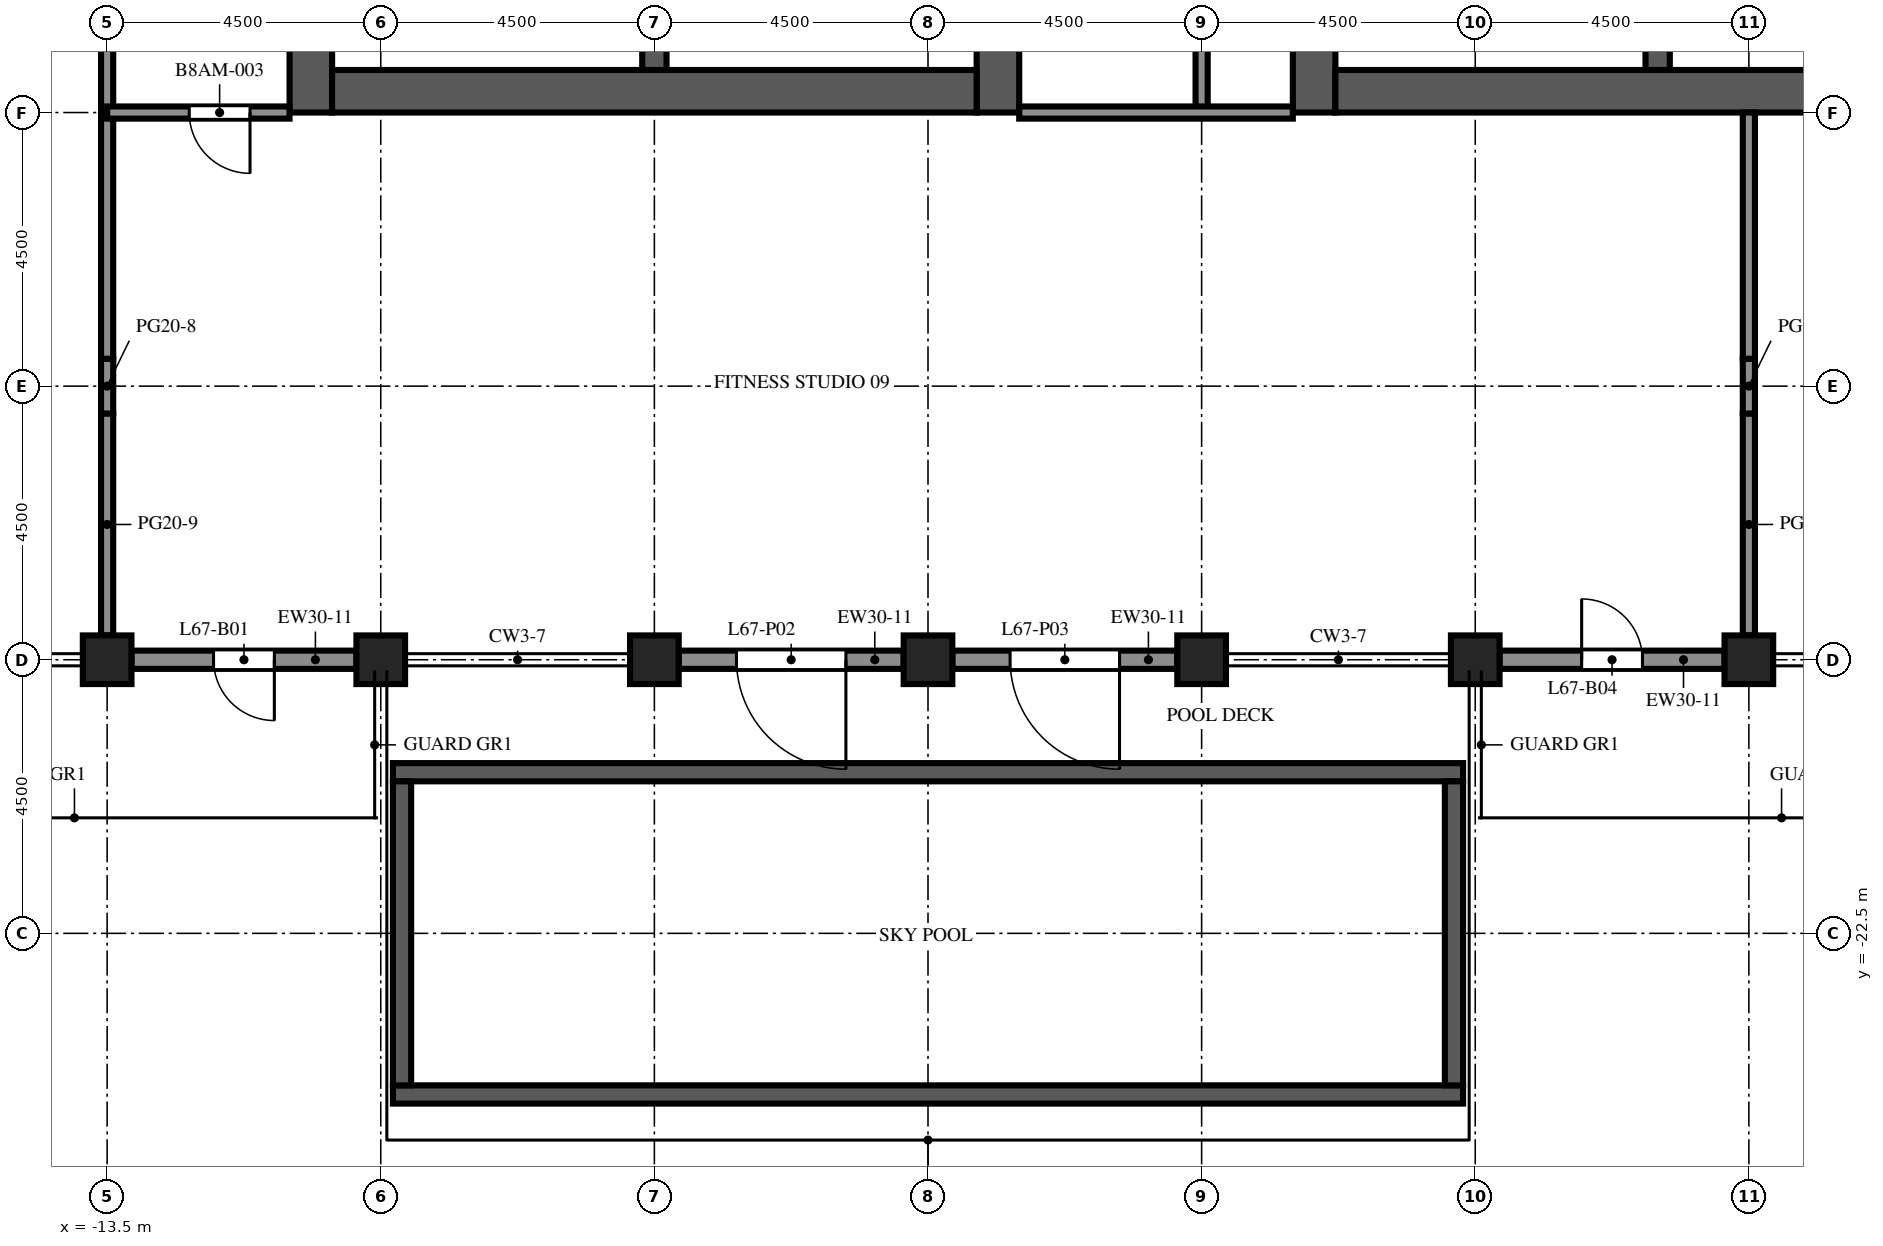
"""IFC4 building model, lengths in metres.
Left out: names, types, materials, properties, quantities, classifications, styles, units other than length and angle.
Written with IfcOpenShell. Run it as: python <this file> out.ifc"""

import sys

from ifc_helpers import new_model, si_unit, direction, frame, frame_2d, origin, origin_2d, place, context, subcontext, project, spatial, rectangle, extrude, element, fill, save


model = new_model("IFC4")
c1 = context("Model", 3, precision=1e-05, world=origin(), true_north=direction((0.0, 1.0)))
c2 = subcontext(c1, "Body", "Model", "MODEL_VIEW")
j1 = project(units=[si_unit("LENGTHUNIT", "METRE"), si_unit("PLANEANGLEUNIT", "RADIAN")], contexts=[c1])
p1 = place(None, origin())
s1 = spatial("IfcSite", under=j1, at=p1, CompositionType="ELEMENT")
p2 = place(p1, origin())
s2 = spatial("IfcBuilding", under=s1, at=p2, CompositionType="ELEMENT")
p3 = place(p2, frame((0.0, 0.0, 295.0)))
s3 = spatial("IfcBuildingStorey", under=s2, at=p3, CompositionType="ELEMENT", Elevation=295.0)
p4 = place(p3, frame((-13.5, -18.0, 0.0), z_axis=(0.0, 0.0, 1.0), x_axis=(1.0, 0.0, 0.0)))
e1 = element("IfcColumn", 1, at=p4, inside=s3, PredefinedType="COLUMN", context=c2, shape_type="SweptSolid", body=[
    extrude(rectangle(XDim=0.8, YDim=0.8, at=origin_2d()), origin(), (0.0, 0.0, 1.0), 6.0),
])
p5 = place(p3, frame((-9.0, -18.0, 0.0), z_axis=(0.0, 0.0, 1.0), x_axis=(1.0, 0.0, 0.0)))
e2 = element("IfcColumn", 2, at=p5, inside=s3, PredefinedType="COLUMN", context=c2, shape_type="SweptSolid", body=[
    extrude(rectangle(XDim=0.8, YDim=0.8, at=origin_2d()), origin(), (0.0, 0.0, 1.0), 3.6),
])
p6 = place(p3, frame((-4.5, -18.0, 0.0), z_axis=(0.0, 0.0, 1.0), x_axis=(1.0, 0.0, 0.0)))
e3 = element("IfcColumn", 3, at=p6, inside=s3, PredefinedType="COLUMN", context=c2, shape_type="SweptSolid", body=[
    extrude(rectangle(XDim=0.8, YDim=0.8, at=origin_2d()), origin(), (0.0, 0.0, 1.0), 6.0),
])
p7 = place(p3, frame((0.0, -18.0, 0.0), z_axis=(0.0, 0.0, 1.0), x_axis=(1.0, 0.0, 0.0)))
e4 = element("IfcColumn", 4, at=p7, inside=s3, PredefinedType="COLUMN", context=c2, shape_type="SweptSolid", body=[
    extrude(rectangle(XDim=0.8, YDim=0.8, at=origin_2d()), origin(), (0.0, 0.0, 1.0), 3.6),
])
p8 = place(p3, frame((4.5, -18.0, 0.0), z_axis=(0.0, 0.0, 1.0), x_axis=(1.0, 0.0, 0.0)))
e5 = element("IfcColumn", 5, at=p8, inside=s3, PredefinedType="COLUMN", context=c2, shape_type="SweptSolid", body=[
    extrude(rectangle(XDim=0.8, YDim=0.8, at=origin_2d()), origin(), (0.0, 0.0, 1.0), 6.0),
])
p9 = place(p3, frame((9.0, -18.0, 0.0), z_axis=(0.0, 0.0, 1.0), x_axis=(1.0, 0.0, 0.0)))
e6 = element("IfcColumn", 6, at=p9, inside=s3, PredefinedType="COLUMN", context=c2, shape_type="SweptSolid", body=[
    extrude(rectangle(XDim=0.8, YDim=0.8, at=origin_2d()), origin(), (0.0, 0.0, 1.0), 3.6),
])
p10 = place(p3, frame((13.5, -18.0, 0.0), z_axis=(0.0, 0.0, 1.0), x_axis=(1.0, 0.0, 0.0)))
e7 = element("IfcColumn", 7, at=p10, inside=s3, PredefinedType="COLUMN", context=c2, shape_type="SweptSolid", body=[
    extrude(rectangle(XDim=0.8, YDim=0.8, at=origin_2d()), origin(), (0.0, 0.0, 1.0), 6.0),
])
p11 = place(p3, frame((-10.15, -9.0, 0.0), z_axis=(0.0, 0.0, 1.0), x_axis=(0.0, 1.0, 0.0)))
e8 = element("IfcWall", 8, at=p11, inside=s3, PredefinedType="SHEAR", context=c2, shape_type="SweptSolid", body=[
    extrude(rectangle(XDim=27.5, YDim=0.7, at=frame_2d((13.75, 0.0))), origin(), (0.0, 0.0, 1.0), 6.0),
])
p12 = place(p11, frame((12.55, 0.0, 0.0)))
e9 = element("IfcOpeningElement", 9, at=p12, cuts=e8, PredefinedType="OPENING", context=c2, shape_type="SweptSolid", body=[
    extrude(rectangle(XDim=2.4, YDim=2.4, at=frame_2d((1.2, 1.2))), frame((0.0, 0.36, 0.0), z_axis=(0.0, -1.0, 0.0), x_axis=(1.0, 0.0, 0.0)), (0.0, 0.0, 1.0), 0.72),
])
p13 = place(p11, frame((6.825, 0.0, 0.0)))
e10 = element("IfcOpeningElement", 10, at=p13, cuts=e8, PredefinedType="OPENING", context=c2, shape_type="SweptSolid", body=[
    extrude(rectangle(XDim=1.2, YDim=2.1, at=frame_2d((0.6, 1.05))), frame((0.0, 0.36, 0.0), z_axis=(0.0, -1.0, 0.0), x_axis=(1.0, 0.0, 0.0)), (0.0, 0.0, 1.0), 0.72),
])
p14 = place(p11, frame((19.475, 0.0, 0.0)))
e11 = element("IfcOpeningElement", 11, at=p14, cuts=e8, PredefinedType="OPENING", context=c2, shape_type="SweptSolid", body=[
    extrude(rectangle(XDim=1.2, YDim=2.1, at=frame_2d((0.6, 1.05))), frame((0.0, 0.36, 0.0), z_axis=(0.0, -1.0, 0.0), x_axis=(1.0, 0.0, 0.0)), (0.0, 0.0, 1.0), 0.72),
])
p15 = place(p3, frame((1.15, -9.0, 0.0), z_axis=(0.0, 0.0, 1.0), x_axis=(0.0, 1.0, 0.0)))
e12 = element("IfcWall", 12, at=p15, inside=s3, PredefinedType="SHEAR", context=c2, shape_type="SweptSolid", body=[
    extrude(rectangle(XDim=27.5, YDim=0.7, at=frame_2d((13.75, 0.0))), origin(), (0.0, 0.0, 1.0), 6.0),
])
p16 = place(p15, frame((12.55, 0.0, 0.0)))
e13 = element("IfcOpeningElement", 13, at=p16, cuts=e12, PredefinedType="OPENING", context=c2, shape_type="SweptSolid", body=[
    extrude(rectangle(XDim=2.4, YDim=2.4, at=frame_2d((1.2, 1.2))), frame((0.0, 0.36, 0.0), z_axis=(0.0, -1.0, 0.0), x_axis=(1.0, 0.0, 0.0)), (0.0, 0.0, 1.0), 0.72),
])
p17 = place(p15, frame((5.46, 0.0, 0.0)))
e14 = element("IfcOpeningElement", 14, at=p17, cuts=e12, PredefinedType="OPENING", context=c2, shape_type="SweptSolid", body=[
    extrude(rectangle(XDim=0.968, YDim=2.1, at=frame_2d((0.484, 1.05))), frame((0.0, 0.36, 0.0), z_axis=(0.0, -1.0, 0.0), x_axis=(1.0, 0.0, 0.0)), (0.0, 0.0, 1.0), 0.72),
])
p18 = place(p15, frame((23.54, 0.0, 0.0)))
e15 = element("IfcOpeningElement", 15, at=p18, cuts=e12, PredefinedType="OPENING", context=c2, shape_type="SweptSolid", body=[
    extrude(rectangle(XDim=1.2, YDim=2.1, at=frame_2d((0.6, 1.05))), frame((0.0, 0.36, 0.0), z_axis=(0.0, -1.0, 0.0), x_axis=(1.0, 0.0, 0.0)), (0.0, 0.0, 1.0), 0.72),
])
p19 = place(p3, frame((-9.8, -8.65, 0.0), z_axis=(0.0, 0.0, 1.0), x_axis=(1.0, 0.0, 0.0)))
e16 = element("IfcWall", 16, at=p19, inside=s3, PredefinedType="SHEAR", context=c2, shape_type="SweptSolid", body=[
    extrude(rectangle(XDim=10.6, YDim=0.7, at=frame_2d((5.3, 0.0))), origin(), (0.0, 0.0, 1.0), 6.0),
])
p20 = place(p3, frame((-4.5, -8.3, 0.0), z_axis=(0.0, 0.0, 1.0), x_axis=(0.0, 1.0, 0.0)))
e17 = element("IfcWall", 17, at=p20, inside=s3, PredefinedType="SHEAR", context=c2, shape_type="SweptSolid", body=[
    extrude(rectangle(XDim=7.6, YDim=0.4, at=frame_2d((3.8, 0.0))), origin(), (0.0, 0.0, 1.0), 6.0),
])
p21 = place(p3, frame((6.35, -9.0, 0.0), z_axis=(0.0, 0.0, 1.0), x_axis=(0.0, 1.0, 0.0)))
e18 = element("IfcWall", 18, at=p21, inside=s3, PredefinedType="SHEAR", context=c2, shape_type="SweptSolid", body=[
    extrude(rectangle(XDim=27.5, YDim=0.7, at=frame_2d((13.75, 0.0))), origin(), (0.0, 0.0, 1.0), 6.0),
])
p22 = place(p21, frame((12.55, 0.0, 0.0)))
e19 = element("IfcOpeningElement", 19, at=p22, cuts=e18, PredefinedType="OPENING", context=c2, shape_type="SweptSolid", body=[
    extrude(rectangle(XDim=2.4, YDim=2.4, at=frame_2d((1.2, 1.2))), frame((0.0, 0.36, 0.0), z_axis=(0.0, -1.0, 0.0), x_axis=(1.0, 0.0, 0.0)), (0.0, 0.0, 1.0), 0.72),
])
p23 = place(p21, frame((5.46, 0.0, 0.0)))
e20 = element("IfcOpeningElement", 20, at=p23, cuts=e18, PredefinedType="OPENING", context=c2, shape_type="SweptSolid", body=[
    extrude(rectangle(XDim=0.968, YDim=2.1, at=frame_2d((0.484, 1.05))), frame((0.0, 0.36, 0.0), z_axis=(0.0, -1.0, 0.0), x_axis=(1.0, 0.0, 0.0)), (0.0, 0.0, 1.0), 0.72),
])
p24 = place(p21, frame((23.54, 0.0, 0.0)))
e21 = element("IfcOpeningElement", 21, at=p24, cuts=e18, PredefinedType="OPENING", context=c2, shape_type="SweptSolid", body=[
    extrude(rectangle(XDim=1.2, YDim=2.1, at=frame_2d((0.6, 1.05))), frame((0.0, 0.36, 0.0), z_axis=(0.0, -1.0, 0.0), x_axis=(1.0, 0.0, 0.0)), (0.0, 0.0, 1.0), 0.72),
])
p25 = place(p3, frame((6.7, -8.65, 0.0), z_axis=(0.0, 0.0, 1.0), x_axis=(1.0, 0.0, 0.0)))
e22 = element("IfcWall", 22, at=p25, inside=s3, PredefinedType="SHEAR", context=c2, shape_type="SweptSolid", body=[
    extrude(rectangle(XDim=10.6, YDim=0.7, at=frame_2d((5.3, 0.0))), origin(), (0.0, 0.0, 1.0), 6.0),
])
p26 = place(p3, frame((12.0, -8.3, 0.0), z_axis=(0.0, 0.0, 1.0), x_axis=(0.0, 1.0, 0.0)))
e23 = element("IfcWall", 23, at=p26, inside=s3, PredefinedType="SHEAR", context=c2, shape_type="SweptSolid", body=[
    extrude(rectangle(XDim=7.6, YDim=0.4, at=frame_2d((3.8, 0.0))), origin(), (0.0, 0.0, 1.0), 6.0),
])
for number, where, z_axis, x_axis in (
    (24, (-8.8, -25.15, 0.0), (0.0, 0.0, 1.0), (1.0, 0.0, 0.0)),
    (25, (-8.8, -19.85, 0.0), (0.0, 0.0, 1.0), (1.0, 0.0, 0.0)),
):
    element("IfcWall", number, at=place(p3, frame(where, z_axis=z_axis, x_axis=x_axis)), inside=s3, PredefinedType="SOLIDWALL", context=c2, shape_type="SweptSolid", body=[
        extrude(rectangle(XDim=17.6, YDim=0.3, at=frame_2d((8.8, 0.0))), origin(), (0.0, 0.0, 1.0), 1.7),
    ])
for number, where, z_axis, x_axis in (
    (26, (-8.65, -25.0, 0.0), (0.0, 0.0, 1.0), (0.0, 1.0, 0.0)),
    (27, (8.65, -25.0, 0.0), (0.0, 0.0, 1.0), (0.0, 1.0, 0.0)),
):
    element("IfcWall", number, at=place(p3, frame(where, z_axis=z_axis, x_axis=x_axis)), inside=s3, PredefinedType="SOLIDWALL", context=c2, shape_type="SweptSolid", body=[
        extrude(rectangle(XDim=5.0, YDim=0.3, at=frame_2d((2.5, 0.0))), origin(), (0.0, 0.0, 1.0), 1.7),
    ])
p27 = place(p3, frame((-9.4, -18.0, 0.0), z_axis=(0.0, 0.0, 1.0), x_axis=(-1.0, 0.0, 0.0)))
e28 = element("IfcWall", 28, at=p27, inside=s3, PredefinedType="SOLIDWALL", context=c2, shape_type="SweptSolid", body=[
    extrude(rectangle(XDim=3.7, YDim=0.3, at=frame_2d((1.85, 0.0))), origin(), (0.0, 0.0, 1.0), 3.6),
])
p28 = place(p27, frame((1.35, 0.0, 0.0)))
e29 = element("IfcOpeningElement", 29, at=p28, cuts=e28, PredefinedType="OPENING", context=c2, shape_type="SweptSolid", body=[
    extrude(rectangle(XDim=1.0, YDim=2.2, at=frame_2d((0.5, 1.1))), frame((0.0, 0.16, 0.0), z_axis=(0.0, -1.0, 0.0), x_axis=(1.0, 0.0, 0.0)), (0.0, 0.0, 1.0), 0.32),
])
p29 = place(p3, frame((-0.4, -18.0, 0.0), z_axis=(0.0, 0.0, 1.0), x_axis=(-1.0, 0.0, 0.0)))
e30 = element("IfcWall", 30, at=p29, inside=s3, PredefinedType="SOLIDWALL", context=c2, shape_type="SweptSolid", body=[
    extrude(rectangle(XDim=3.7, YDim=0.3, at=frame_2d((1.85, 0.0))), origin(), (0.0, 0.0, 1.0), 3.6),
])
p30 = place(p29, frame((0.95, 0.0, 0.0)))
e31 = element("IfcOpeningElement", 31, at=p30, cuts=e30, PredefinedType="OPENING", context=c2, shape_type="SweptSolid", body=[
    extrude(rectangle(XDim=1.8, YDim=2.4, at=frame_2d((0.9, 1.2))), frame((0.0, 0.16, 0.0), z_axis=(0.0, -1.0, 0.0), x_axis=(1.0, 0.0, 0.0)), (0.0, 0.0, 1.0), 0.32),
])
p31 = place(p3, frame((4.1, -18.0, 0.0), z_axis=(0.0, 0.0, 1.0), x_axis=(-1.0, 0.0, 0.0)))
e32 = element("IfcWall", 32, at=p31, inside=s3, PredefinedType="SOLIDWALL", context=c2, shape_type="SweptSolid", body=[
    extrude(rectangle(XDim=3.7, YDim=0.3, at=frame_2d((1.85, 0.0))), origin(), (0.0, 0.0, 1.0), 3.6),
])
p32 = place(p31, frame((0.95, 0.0, 0.0)))
e33 = element("IfcOpeningElement", 33, at=p32, cuts=e32, PredefinedType="OPENING", context=c2, shape_type="SweptSolid", body=[
    extrude(rectangle(XDim=1.8, YDim=2.4, at=frame_2d((0.9, 1.2))), frame((0.0, 0.16, 0.0), z_axis=(0.0, -1.0, 0.0), x_axis=(1.0, 0.0, 0.0)), (0.0, 0.0, 1.0), 0.32),
])
p33 = place(p3, frame((13.1, -18.0, 0.0), z_axis=(0.0, 0.0, 1.0), x_axis=(-1.0, 0.0, 0.0)))
e34 = element("IfcWall", 34, at=p33, inside=s3, PredefinedType="SOLIDWALL", context=c2, shape_type="SweptSolid", body=[
    extrude(rectangle(XDim=3.7, YDim=0.3, at=frame_2d((1.85, 0.0))), origin(), (0.0, 0.0, 1.0), 3.6),
])
p34 = place(p33, frame((1.35, 0.0, 0.0)))
e35 = element("IfcOpeningElement", 35, at=p34, cuts=e34, PredefinedType="OPENING", context=c2, shape_type="SweptSolid", body=[
    extrude(rectangle(XDim=1.0, YDim=2.2, at=frame_2d((0.5, 1.1))), frame((0.0, 0.16, 0.0), z_axis=(0.0, -1.0, 0.0), x_axis=(1.0, 0.0, 0.0)), (0.0, 0.0, 1.0), 0.32),
])
for number, where, z_axis, x_axis in (
    (36, (-1.75, -8.3, 0.0), (0.0, 0.0, 1.0), (0.0, 1.0, 0.0)),
    (37, (9.25, -8.3, 0.0), (0.0, 0.0, 1.0), (0.0, 1.0, 0.0)),
):
    element("IfcWall", number, at=place(p3, frame(where, z_axis=z_axis, x_axis=x_axis)), inside=s3, PredefinedType="PARTITIONING", context=c2, shape_type="SweptSolid", body=[
        extrude(rectangle(XDim=4.56, YDim=0.1, at=frame_2d((2.28, 0.0))), origin(), (0.0, 0.0, 1.0), 5.4),
    ])
p35 = place(p3, frame((-13.5, -17.6, 0.0), z_axis=(0.0, 0.0, 1.0), x_axis=(0.0, 1.0, 0.0)))
e38 = element("IfcWall", 38, at=p35, inside=s3, PredefinedType="PARTITIONING", context=c2, shape_type="SweptSolid", body=[
    extrude(rectangle(XDim=3.65, YDim=0.2, at=frame_2d((1.825, 0.0))), origin(), (0.0, 0.0, 1.0), 4.77),
])
p36 = place(p3, frame((-13.5, -13.95, 0.0), z_axis=(0.0, 0.0, 1.0), x_axis=(0.0, 1.0, 0.0)))
e39 = element("IfcWall", 39, at=p36, inside=s3, PredefinedType="PARTITIONING", context=c2, shape_type="SweptSolid", body=[
    extrude(rectangle(XDim=0.9, YDim=0.2, at=frame_2d((0.45, 0.0))), origin(), (0.0, 0.0, 1.0), 3.57),
])
p37 = place(p3, frame((-13.5, -13.05, 0.0), z_axis=(0.0, 0.0, 1.0), x_axis=(0.0, 1.0, 0.0)))
e40 = element("IfcWall", 40, at=p37, inside=s3, PredefinedType="PARTITIONING", context=c2, shape_type="SweptSolid", body=[
    extrude(rectangle(XDim=16.3, YDim=0.2, at=frame_2d((8.15, 0.0))), origin(), (0.0, 0.0, 1.0), 5.4),
])
p38 = place(p37, frame((9.15, 0.0, 0.0)))
e41 = element("IfcOpeningElement", 41, at=p38, cuts=e40, PredefinedType="OPENING", context=c2, shape_type="SweptSolid", body=[
    extrude(rectangle(XDim=1.0, YDim=2.1, at=frame_2d((0.5, 1.05))), frame((0.0, 0.11, 0.0), z_axis=(0.0, -1.0, 0.0), x_axis=(1.0, 0.0, 0.0)), (0.0, 0.0, 1.0), 0.22),
])
p39 = place(p3, frame((4.5, -4.5, 0.0), z_axis=(0.0, 0.0, 1.0), x_axis=(0.0, -1.0, 0.0)))
e42 = element("IfcWall", 42, at=p39, inside=s3, PredefinedType="PARTITIONING", context=c2, shape_type="SweptSolid", body=[
    extrude(rectangle(XDim=4.5, YDim=0.2, at=frame_2d((2.25, 0.0))), origin(), (0.0, 0.0, 1.0), 5.4),
])
p40 = place(p39, frame((1.65, 0.0, 0.0)))
e43 = element("IfcOpeningElement", 43, at=p40, cuts=e42, PredefinedType="OPENING", context=c2, shape_type="SweptSolid", body=[
    extrude(rectangle(XDim=1.0, YDim=2.1, at=frame_2d((0.5, 1.05))), frame((0.0, 0.11, 0.0), z_axis=(0.0, -1.0, 0.0), x_axis=(1.0, 0.0, 0.0)), (0.0, 0.0, 1.0), 0.22),
])
p41 = place(p3, frame((13.5, -17.6, 0.0), z_axis=(0.0, 0.0, 1.0), x_axis=(0.0, 1.0, 0.0)))
e44 = element("IfcWall", 44, at=p41, inside=s3, PredefinedType="PARTITIONING", context=c2, shape_type="SweptSolid", body=[
    extrude(rectangle(XDim=3.65, YDim=0.2, at=frame_2d((1.825, 0.0))), origin(), (0.0, 0.0, 1.0), 4.77),
])
p42 = place(p3, frame((13.5, -13.95, 0.0), z_axis=(0.0, 0.0, 1.0), x_axis=(0.0, 1.0, 0.0)))
e45 = element("IfcWall", 45, at=p42, inside=s3, PredefinedType="PARTITIONING", context=c2, shape_type="SweptSolid", body=[
    extrude(rectangle(XDim=0.9, YDim=0.2, at=frame_2d((0.45, 0.0))), origin(), (0.0, 0.0, 1.0), 3.57),
])
p43 = place(p3, frame((13.5, -13.05, 0.0), z_axis=(0.0, 0.0, 1.0), x_axis=(0.0, 1.0, 0.0)))
e46 = element("IfcWall", 46, at=p43, inside=s3, PredefinedType="PARTITIONING", context=c2, shape_type="SweptSolid", body=[
    extrude(rectangle(XDim=4.05, YDim=0.2, at=frame_2d((2.025, 0.0))), origin(), (0.0, 0.0, 1.0), 5.4),
])
p44 = place(p3, frame((-10.5, -9.0, 0.0), z_axis=(0.0, 0.0, 1.0), x_axis=(-1.0, 0.0, 0.0)))
e47 = element("IfcWall", 47, at=p44, inside=s3, PredefinedType="PARTITIONING", context=c2, shape_type="SweptSolid", body=[
    extrude(rectangle(XDim=3.0, YDim=0.2, at=frame_2d((1.5, 0.0))), origin(), (0.0, 0.0, 1.0), 5.4),
])
p45 = place(p44, frame((0.65, 0.0, 0.0)))
e48 = element("IfcOpeningElement", 48, at=p45, cuts=e47, PredefinedType="OPENING", context=c2, shape_type="SweptSolid", body=[
    extrude(rectangle(XDim=1.0, YDim=2.1, at=frame_2d((0.5, 1.05))), frame((0.0, 0.11, 0.0), z_axis=(0.0, -1.0, 0.0), x_axis=(1.0, 0.0, 0.0)), (0.0, 0.0, 1.0), 0.22),
])
p46 = place(p3, frame((1.5, -9.0, 0.0), z_axis=(0.0, 0.0, 1.0), x_axis=(1.0, 0.0, 0.0)))
e49 = element("IfcWall", 49, at=p46, inside=s3, PredefinedType="PARTITIONING", context=c2, shape_type="SweptSolid", body=[
    extrude(rectangle(XDim=4.5, YDim=0.2, at=frame_2d((2.25, 0.0))), origin(), (0.0, 0.0, 1.0), 5.4),
])
p47 = place(p28, origin())
e50 = element("IfcDoor", 50, at=p47, inside=s3, OperationType="SINGLE_SWING_LEFT", PredefinedType="DOOR", context=c2, shape_type="SweptSolid", body=[
    extrude(rectangle(XDim=1.0, YDim=2.2, at=frame_2d((0.5, 1.1))), frame((0.0, 0.025, 0.0), z_axis=(0.0, -1.0, 0.0), x_axis=(1.0, 0.0, 0.0)), (0.0, 0.0, 1.0), 0.05),
])
fill(e29, e50)
p48 = place(p30, origin())
e51 = element("IfcDoor", 51, at=p48, inside=s3, OperationType="SINGLE_SWING_LEFT", PredefinedType="DOOR", context=c2, shape_type="SweptSolid", body=[
    extrude(rectangle(XDim=1.8, YDim=2.4, at=frame_2d((0.9, 1.2))), frame((0.0, 0.025, 0.0), z_axis=(0.0, -1.0, 0.0), x_axis=(1.0, 0.0, 0.0)), (0.0, 0.0, 1.0), 0.05),
])
fill(e31, e51)
p49 = place(p32, origin())
e52 = element("IfcDoor", 52, at=p49, inside=s3, OperationType="SINGLE_SWING_LEFT", PredefinedType="DOOR", context=c2, shape_type="SweptSolid", body=[
    extrude(rectangle(XDim=1.8, YDim=2.4, at=frame_2d((0.9, 1.2))), frame((0.0, 0.025, 0.0), z_axis=(0.0, -1.0, 0.0), x_axis=(1.0, 0.0, 0.0)), (0.0, 0.0, 1.0), 0.05),
])
fill(e33, e52)
p50 = place(p34, origin())
e53 = element("IfcDoor", 53, at=p50, inside=s3, OperationType="SINGLE_SWING_RIGHT", PredefinedType="DOOR", context=c2, shape_type="SweptSolid", body=[
    extrude(rectangle(XDim=1.0, YDim=2.2, at=frame_2d((0.5, 1.1))), frame((0.0, 0.025, 0.0), z_axis=(0.0, -1.0, 0.0), x_axis=(1.0, 0.0, 0.0)), (0.0, 0.0, 1.0), 0.05),
])
fill(e35, e53)
p51 = place(p45, origin())
e54 = element("IfcDoor", 54, at=p51, inside=s3, OperationType="SINGLE_SWING_LEFT", PredefinedType="DOOR", context=c2, shape_type="SweptSolid", body=[
    extrude(rectangle(XDim=1.0, YDim=2.1, at=frame_2d((0.5, 1.05))), frame((0.0, 0.025, 0.0), z_axis=(0.0, -1.0, 0.0), x_axis=(1.0, 0.0, 0.0)), (0.0, 0.0, 1.0), 0.05),
])
fill(e48, e54)
save(model, sys.argv[1])
